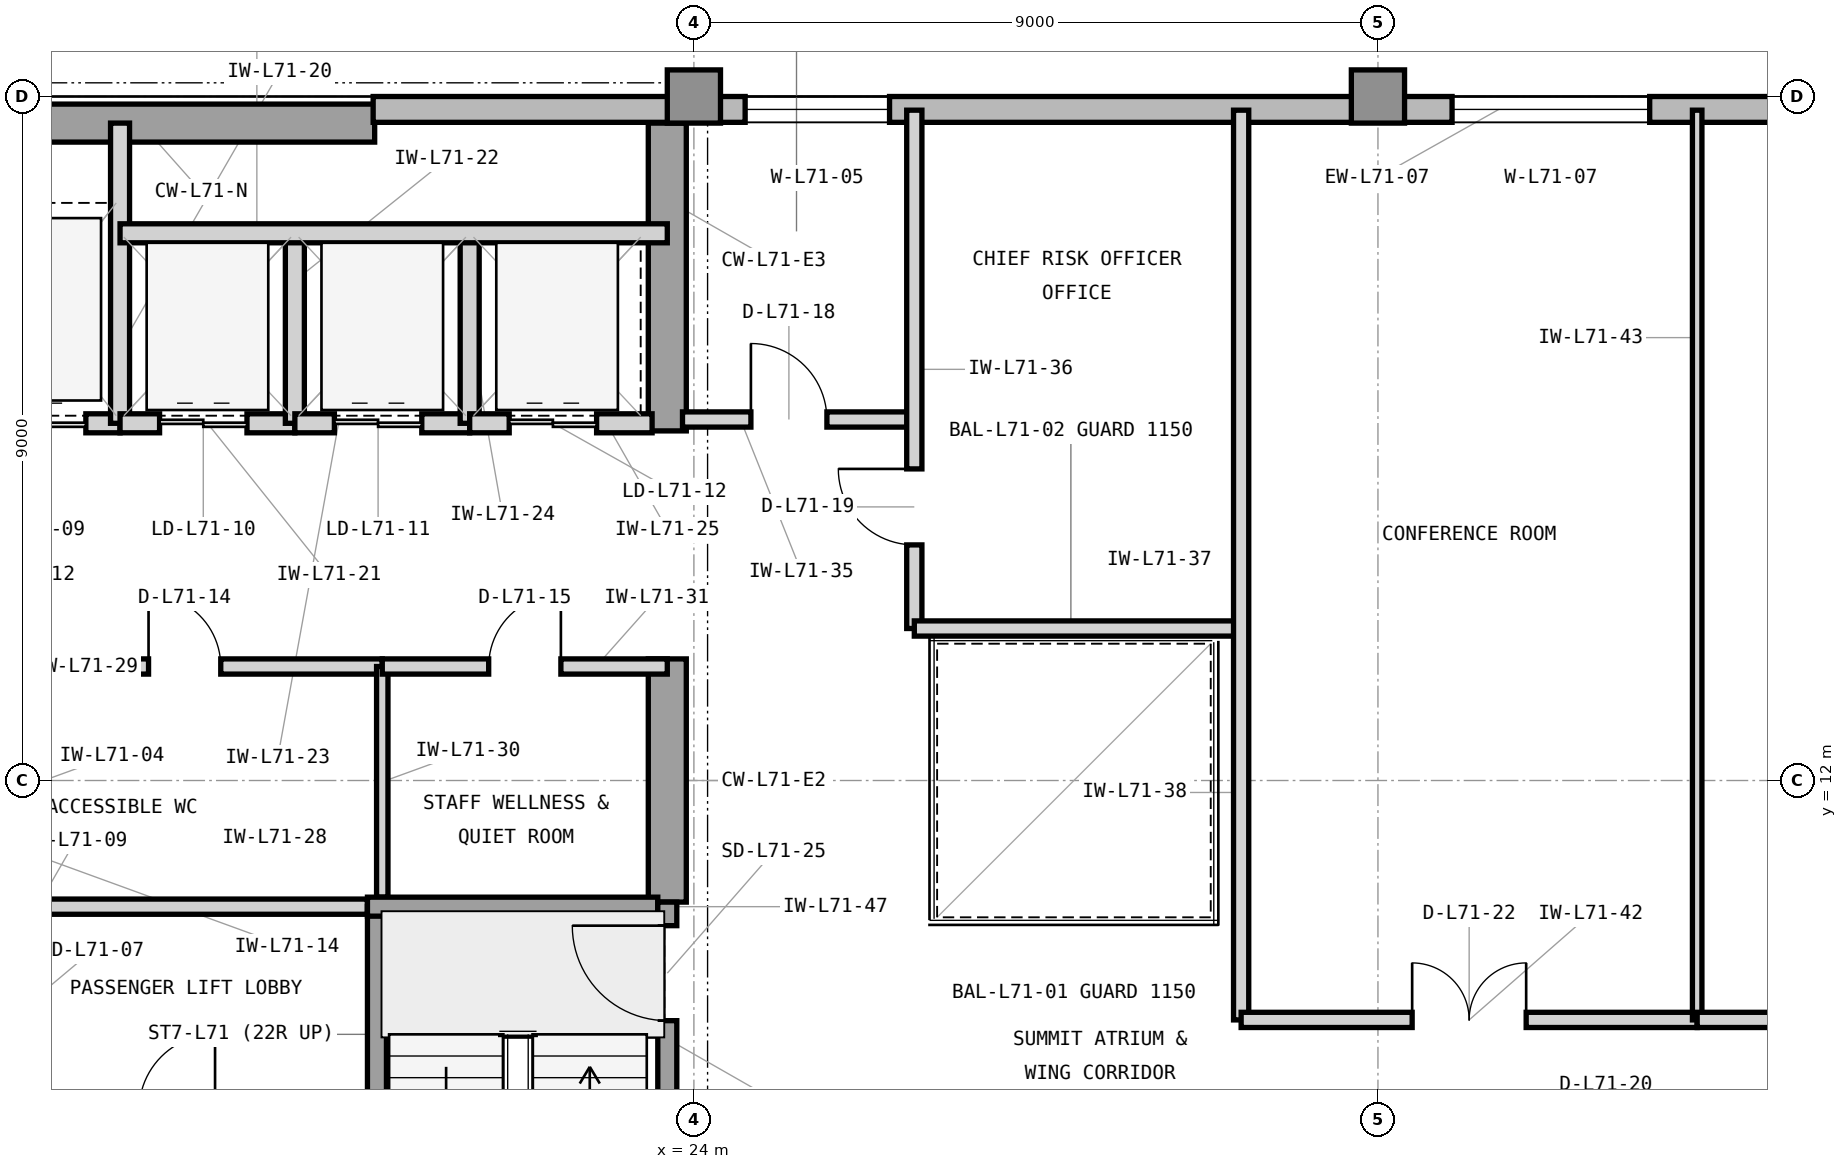
"""IFC4 building model, lengths in metres.
Left out: names, types, materials, properties, quantities, classifications, styles, units other than length and angle.
Written with IfcOpenShell. Run it as: python <this file> out.ifc"""

import sys

from ifc_helpers import new_model, si_unit, direction, frame, frame_2d, origin, origin_2d, place, context, subcontext, project, spatial, rectangle, extrude, element, fill, save


model = new_model("IFC4")
c1 = context("Model", 3, precision=1e-05, world=origin(), true_north=direction((0.0, 1.0)))
c2 = subcontext(c1, "Body", "Model", "MODEL_VIEW")
j1 = project(units=[si_unit("LENGTHUNIT", "METRE"), si_unit("PLANEANGLEUNIT", "RADIAN")], contexts=[c1])
p1 = place(None, origin())
s1 = spatial("IfcSite", under=j1, at=p1, CompositionType="ELEMENT")
p2 = place(p1, origin())
s2 = spatial("IfcBuilding", under=s1, at=p2, CompositionType="ELEMENT")
p3 = place(p2, frame((0.0, 0.0, 289.8)))
s3 = spatial("IfcBuildingStorey", under=s2, at=p3, CompositionType="ELEMENT", Elevation=289.8)
p4 = place(p3, frame((7.475, 20.65, 0.0), z_axis=(0.0, 0.0, 1.0), x_axis=(1.0, 0.0, 0.0)))
e1 = element("IfcWall", 1, at=p4, inside=s3, PredefinedType="SHEAR", context=c2, shape_type="SweptSolid", body=[
    extrude(rectangle(XDim=12.325, YDim=0.5, at=frame_2d((6.163, 0.0))), origin(), (0.0, 0.0, 1.0), 3.9),
])
p5 = place(p3, frame((23.65, 10.4, 0.0), z_axis=(0.0, 0.0, 1.0), x_axis=(0.0, 1.0, 0.0)))
e2 = element("IfcWall", 2, at=p5, inside=s3, PredefinedType="SHEAR", context=c2, shape_type="SweptSolid", body=[
    extrude(rectangle(XDim=3.2, YDim=0.5, at=frame_2d((1.6, 0.0))), origin(), (0.0, 0.0, 1.0), 3.9),
])
p6 = place(p3, frame((23.65, 16.6, 0.0), z_axis=(0.0, 0.0, 1.0), x_axis=(0.0, 1.0, 0.0)))
e3 = element("IfcWall", 3, at=p6, inside=s3, PredefinedType="SHEAR", context=c2, shape_type="SweptSolid", body=[
    extrude(rectangle(XDim=4.05, YDim=0.5, at=frame_2d((2.025, 0.0))), origin(), (0.0, 0.0, 1.0), 3.9),
])
for number, where, z_axis, x_axis in (
    (4, (24.0, 21.0, 0.0), (0.0, 0.0, 1.0), (1.0, 0.0, 0.0)),
    (5, (33.0, 21.0, 0.0), (0.0, 0.0, 1.0), (1.0, 0.0, 0.0)),
):
    element("IfcColumn", number, at=place(p3, frame(where, z_axis=z_axis, x_axis=x_axis)), inside=s3, PredefinedType="COLUMN", context=c2, shape_type="SweptSolid", body=[
        extrude(rectangle(XDim=0.7, YDim=0.7, at=origin_2d()), origin(), (0.0, 0.0, 1.0), 3.9),
    ])
p7 = place(p3, frame((49.4, 20.83, 0.0), z_axis=(0.0, 0.0, 1.0), x_axis=(-1.0, 0.0, 0.0)))
e6 = element("IfcWall", 6, at=p7, inside=s3, PredefinedType="STANDARD", context=c2, shape_type="SweptSolid", body=[
    extrude(rectangle(XDim=29.62, YDim=0.34, at=frame_2d((14.81, 0.0))), origin(), (0.0, 0.0, 1.0), 3.715),
])
p8 = place(p7, frame((22.826, 0.0, 0.8)))
e7 = element("IfcOpeningElement", 7, at=p8, cuts=e6, PredefinedType="OPENING", context=c2, shape_type="SweptSolid", body=[
    extrude(rectangle(XDim=1.9, YDim=2.35, at=frame_2d((0.95, 1.175))), frame((0.0, 0.18, 0.0), z_axis=(0.0, -1.0, 0.0), x_axis=(1.0, 0.0, 0.0)), (0.0, 0.0, 1.0), 0.36),
])
p9 = place(p7, frame((12.825, 0.0, 0.8)))
e8 = element("IfcOpeningElement", 8, at=p9, cuts=e6, PredefinedType="OPENING", context=c2, shape_type="SweptSolid", body=[
    extrude(rectangle(XDim=2.6, YDim=2.35, at=frame_2d((1.3, 1.175))), frame((0.0, 0.18, 0.0), z_axis=(0.0, -1.0, 0.0), x_axis=(1.0, 0.0, 0.0)), (0.0, 0.0, 1.0), 0.36),
])
p10 = place(p7, frame((8.375, 0.0, 0.8)))
e9 = element("IfcOpeningElement", 9, at=p10, cuts=e6, PredefinedType="OPENING", context=c2, shape_type="SweptSolid", body=[
    extrude(rectangle(XDim=2.6, YDim=2.35, at=frame_2d((1.3, 1.175))), frame((0.0, 0.18, 0.0), z_axis=(0.0, -1.0, 0.0), x_axis=(1.0, 0.0, 0.0)), (0.0, 0.0, 1.0), 0.36),
])
p11 = place(p3, frame((14.15, 16.7, 0.0), z_axis=(0.0, 0.0, 1.0), x_axis=(1.0, 0.0, 0.0)))
e10 = element("IfcWall", 10, at=p11, inside=s3, PredefinedType="PARTITIONING", context=c2, shape_type="SweptSolid", body=[
    extrude(rectangle(XDim=2.3, YDim=0.25, at=frame_2d((1.15, 0.0))), origin(), (0.0, 0.0, 1.0), 3.354),
])
p12 = place(p11, frame((0.45, 0.0, 0.0)))
e11 = element("IfcOpeningElement", 11, at=p12, cuts=e10, PredefinedType="OPENING", context=c2, shape_type="SweptSolid", body=[
    extrude(rectangle(XDim=1.4, YDim=2.35, at=frame_2d((0.7, 1.175))), frame((0.0, 0.135, 0.0), z_axis=(0.0, -1.0, 0.0), x_axis=(1.0, 0.0, 0.0)), (0.0, 0.0, 1.0), 0.27),
])
p13 = place(p3, frame((16.45, 16.7, 0.0), z_axis=(0.0, 0.0, 1.0), x_axis=(0.0, 1.0, 0.0)))
e12 = element("IfcWall", 12, at=p13, inside=s3, PredefinedType="PARTITIONING", context=c2, shape_type="SweptSolid", body=[
    extrude(rectangle(XDim=3.95, YDim=0.25, at=frame_2d((1.975, 0.0))), origin(), (0.0, 0.0, 1.0), 3.705),
])
p14 = place(p3, frame((16.45, 16.7, 0.0), z_axis=(0.0, 0.0, 1.0), x_axis=(1.0, 0.0, 0.0)))
e13 = element("IfcWall", 13, at=p14, inside=s3, PredefinedType="PARTITIONING", context=c2, shape_type="SweptSolid", body=[
    extrude(rectangle(XDim=2.3, YDim=0.25, at=frame_2d((1.15, 0.0))), origin(), (0.0, 0.0, 1.0), 3.354),
])
p15 = place(p14, frame((0.52, 0.0, 0.0)))
e14 = element("IfcOpeningElement", 14, at=p15, cuts=e13, PredefinedType="OPENING", context=c2, shape_type="SweptSolid", body=[
    extrude(rectangle(XDim=1.15, YDim=2.25, at=frame_2d((0.575, 1.125))), frame((0.0, 0.135, 0.0), z_axis=(0.0, -1.0, 0.0), x_axis=(1.0, 0.0, 0.0)), (0.0, 0.0, 1.0), 0.27),
])
p16 = place(p3, frame((18.75, 16.7, 0.0), z_axis=(0.0, 0.0, 1.0), x_axis=(0.0, 1.0, 0.0)))
e15 = element("IfcWall", 15, at=p16, inside=s3, PredefinedType="PARTITIONING", context=c2, shape_type="SweptSolid", body=[
    extrude(rectangle(XDim=2.5, YDim=0.25, at=frame_2d((1.25, 0.0))), origin(), (0.0, 0.0, 1.0), 3.705),
])
p17 = place(p3, frame((18.75, 16.7, 0.0), z_axis=(0.0, 0.0, 1.0), x_axis=(1.0, 0.0, 0.0)))
e16 = element("IfcWall", 16, at=p17, inside=s3, PredefinedType="PARTITIONING", context=c2, shape_type="SweptSolid", body=[
    extrude(rectangle(XDim=2.3, YDim=0.25, at=frame_2d((1.15, 0.0))), origin(), (0.0, 0.0, 1.0), 3.354),
])
p18 = place(p17, frame((0.52, 0.0, 0.0)))
e17 = element("IfcOpeningElement", 17, at=p18, cuts=e16, PredefinedType="OPENING", context=c2, shape_type="SweptSolid", body=[
    extrude(rectangle(XDim=1.15, YDim=2.25, at=frame_2d((0.575, 1.125))), frame((0.0, 0.135, 0.0), z_axis=(0.0, -1.0, 0.0), x_axis=(1.0, 0.0, 0.0)), (0.0, 0.0, 1.0), 0.27),
])
p19 = place(p3, frame((21.05, 16.7, 0.0), z_axis=(0.0, 0.0, 1.0), x_axis=(0.0, 1.0, 0.0)))
e18 = element("IfcWall", 18, at=p19, inside=s3, PredefinedType="PARTITIONING", context=c2, shape_type="SweptSolid", body=[
    extrude(rectangle(XDim=2.5, YDim=0.25, at=frame_2d((1.25, 0.0))), origin(), (0.0, 0.0, 1.0), 3.705),
])
p20 = place(p3, frame((21.05, 16.7, 0.0), z_axis=(0.0, 0.0, 1.0), x_axis=(1.0, 0.0, 0.0)))
e19 = element("IfcWall", 19, at=p20, inside=s3, PredefinedType="PARTITIONING", context=c2, shape_type="SweptSolid", body=[
    extrude(rectangle(XDim=2.4, YDim=0.25, at=frame_2d((1.2, 0.0))), origin(), (0.0, 0.0, 1.0), 3.354),
])
p21 = place(p20, frame((0.52, 0.0, 0.0)))
e20 = element("IfcOpeningElement", 20, at=p21, cuts=e19, PredefinedType="OPENING", context=c2, shape_type="SweptSolid", body=[
    extrude(rectangle(XDim=1.15, YDim=2.25, at=frame_2d((0.575, 1.125))), frame((0.0, 0.135, 0.0), z_axis=(0.0, -1.0, 0.0), x_axis=(1.0, 0.0, 0.0)), (0.0, 0.0, 1.0), 0.27),
])
p22 = place(p3, frame((16.45, 19.2, 0.0), z_axis=(0.0, 0.0, 1.0), x_axis=(1.0, 0.0, 0.0)))
e21 = element("IfcWall", 21, at=p22, inside=s3, PredefinedType="PARTITIONING", context=c2, shape_type="SweptSolid", body=[
    extrude(rectangle(XDim=7.2, YDim=0.25, at=frame_2d((3.6, 0.0))), origin(), (0.0, 0.0, 1.0), 3.705),
])
p23 = place(p3, frame((14.825, 10.34, 0.0), z_axis=(0.0, 0.0, 1.0), x_axis=(1.0, 0.0, 0.0)))
e22 = element("IfcWall", 22, at=p23, inside=s3, PredefinedType="PARTITIONING", context=c2, shape_type="SweptSolid", body=[
    extrude(rectangle(XDim=4.88, YDim=0.2, at=frame_2d((2.44, 0.0))), origin(), (0.0, 0.0, 1.0), 3.705),
])
p24 = place(p3, frame((14.7, 13.5, 0.0), z_axis=(0.0, 0.0, 1.0), x_axis=(1.0, 0.0, 0.0)))
e23 = element("IfcWall", 23, at=p24, inside=s3, PredefinedType="PARTITIONING", context=c2, shape_type="SweptSolid", body=[
    extrude(rectangle(XDim=5.2, YDim=0.2, at=frame_2d((2.6, 0.0))), origin(), (0.0, 0.0, 1.0), 3.354),
])
p25 = place(p24, frame((2.125, 0.0, 0.0)))
e24 = element("IfcOpeningElement", 24, at=p25, cuts=e23, PredefinedType="OPENING", context=c2, shape_type="SweptSolid", body=[
    extrude(rectangle(XDim=0.95, YDim=2.1, at=frame_2d((0.475, 1.05))), frame((0.0, 0.11, 0.0), z_axis=(0.0, -1.0, 0.0), x_axis=(1.0, 0.0, 0.0)), (0.0, 0.0, 1.0), 0.22),
])
p26 = place(p3, frame((19.9, 10.465, 0.0), z_axis=(0.0, 0.0, 1.0), x_axis=(0.0, 1.0, 0.0)))
e25 = element("IfcWall", 25, at=p26, inside=s3, PredefinedType="PARTITIONING", context=c2, shape_type="SweptSolid", body=[
    extrude(rectangle(XDim=3.035, YDim=0.15, at=frame_2d((1.518, 0.0))), origin(), (0.0, 0.0, 1.0), 3.705),
])
p27 = place(p3, frame((19.9, 13.5, 0.0), z_axis=(0.0, 0.0, 1.0), x_axis=(1.0, 0.0, 0.0)))
e26 = element("IfcWall", 26, at=p27, inside=s3, PredefinedType="PARTITIONING", context=c2, shape_type="SweptSolid", body=[
    extrude(rectangle(XDim=3.75, YDim=0.2, at=frame_2d((1.875, 0.0))), origin(), (0.0, 0.0, 1.0), 3.354),
])
p28 = place(p27, frame((1.4, 0.0, 0.0)))
e27 = element("IfcOpeningElement", 27, at=p28, cuts=e26, PredefinedType="OPENING", context=c2, shape_type="SweptSolid", body=[
    extrude(rectangle(XDim=0.95, YDim=2.1, at=frame_2d((0.475, 1.05))), frame((0.0, 0.11, 0.0), z_axis=(0.0, -1.0, 0.0), x_axis=(1.0, 0.0, 0.0)), (0.0, 0.0, 1.0), 0.22),
])
p29 = place(p3, frame((23.85, 16.75, 0.0), z_axis=(0.0, 0.0, 1.0), x_axis=(1.0, 0.0, 0.0)))
e28 = element("IfcWall", 28, at=p29, inside=s3, PredefinedType="PARTITIONING", context=c2, shape_type="SweptSolid", body=[
    extrude(rectangle(XDim=3.05, YDim=0.2, at=frame_2d((1.525, 0.0))), origin(), (0.0, 0.0, 1.0), 3.705),
])
p30 = place(p29, frame((0.9, 0.0, 0.0)))
e29 = element("IfcOpeningElement", 29, at=p30, cuts=e28, PredefinedType="OPENING", context=c2, shape_type="SweptSolid", body=[
    extrude(rectangle(XDim=1.0, YDim=2.15, at=frame_2d((0.5, 1.075))), frame((0.0, 0.11, 0.0), z_axis=(0.0, -1.0, 0.0), x_axis=(1.0, 0.0, 0.0)), (0.0, 0.0, 1.0), 0.22),
])
p31 = place(p3, frame((26.9, 14.0, 0.0), z_axis=(0.0, 0.0, 1.0), x_axis=(0.0, 1.0, 0.0)))
e30 = element("IfcWall", 30, at=p31, inside=s3, PredefinedType="PARTITIONING", context=c2, shape_type="SweptSolid", body=[
    extrude(rectangle(XDim=6.82, YDim=0.2, at=frame_2d((3.41, 0.0))), origin(), (0.0, 0.0, 1.0), 3.705),
])
p32 = place(p31, frame((1.1, 0.0, 0.0)))
e31 = element("IfcOpeningElement", 31, at=p32, cuts=e30, PredefinedType="OPENING", context=c2, shape_type="SweptSolid", body=[
    extrude(rectangle(XDim=1.0, YDim=2.15, at=frame_2d((0.5, 1.075))), frame((0.0, 0.11, 0.0), z_axis=(0.0, -1.0, 0.0), x_axis=(1.0, 0.0, 0.0)), (0.0, 0.0, 1.0), 0.22),
])
p33 = place(p3, frame((26.9, 14.0, 0.0), z_axis=(0.0, 0.0, 1.0), x_axis=(1.0, 0.0, 0.0)))
e32 = element("IfcWall", 32, at=p33, inside=s3, PredefinedType="PARTITIONING", context=c2, shape_type="SweptSolid", body=[
    extrude(rectangle(XDim=4.3, YDim=0.2, at=frame_2d((2.15, 0.0))), origin(), (0.0, 0.0, 1.0), 3.705),
])
p34 = place(p3, frame((31.2, 8.85, 0.0), z_axis=(0.0, 0.0, 1.0), x_axis=(0.0, 1.0, 0.0)))
e33 = element("IfcWall", 33, at=p34, inside=s3, PredefinedType="PARTITIONING", context=c2, shape_type="SweptSolid", body=[
    extrude(rectangle(XDim=11.97, YDim=0.2, at=frame_2d((5.985, 0.0))), origin(), (0.0, 0.0, 1.0), 3.705),
])
p35 = place(p3, frame((31.2, 8.85, 0.0), z_axis=(0.0, 0.0, 1.0), x_axis=(1.0, 0.0, 0.0)))
e34 = element("IfcWall", 34, at=p35, inside=s3, PredefinedType="PARTITIONING", context=c2, shape_type="SweptSolid", body=[
    extrude(rectangle(XDim=6.0, YDim=0.2, at=frame_2d((3.0, 0.0))), origin(), (0.0, 0.0, 1.0), 3.705),
])
p36 = place(p35, frame((2.25, 0.0, 0.0)))
e35 = element("IfcOpeningElement", 35, at=p36, cuts=e34, PredefinedType="OPENING", context=c2, shape_type="SweptSolid", body=[
    extrude(rectangle(XDim=1.5, YDim=2.3, at=frame_2d((0.75, 1.15))), frame((0.0, 0.11, 0.0), z_axis=(0.0, -1.0, 0.0), x_axis=(1.0, 0.0, 0.0)), (0.0, 0.0, 1.0), 0.22),
])
p37 = place(p3, frame((37.2, 8.85, 0.0), z_axis=(0.0, 0.0, 1.0), x_axis=(0.0, 1.0, 0.0)))
e36 = element("IfcWall", 36, at=p37, inside=s3, PredefinedType="PARTITIONING", context=c2, shape_type="SweptSolid", body=[
    extrude(rectangle(XDim=11.97, YDim=0.125, at=frame_2d((5.985, 0.0))), origin(), (0.0, 0.0, 1.0), 3.705),
])
p38 = place(p3, frame((37.2, 8.85, 0.0), z_axis=(0.0, 0.0, 1.0), x_axis=(1.0, 0.0, 0.0)))
e37 = element("IfcWall", 37, at=p38, inside=s3, PredefinedType="PARTITIONING", context=c2, shape_type="SweptSolid", body=[
    extrude(rectangle(XDim=7.3, YDim=0.2, at=frame_2d((3.65, 0.0))), origin(), (0.0, 0.0, 1.0), 3.705),
])
p39 = place(p38, frame((3.15, 0.0, 0.0)))
e38 = element("IfcOpeningElement", 38, at=p39, cuts=e37, PredefinedType="OPENING", context=c2, shape_type="SweptSolid", body=[
    extrude(rectangle(XDim=1.0, YDim=2.15, at=frame_2d((0.5, 1.075))), frame((0.0, 0.11, 0.0), z_axis=(0.0, -1.0, 0.0), x_axis=(1.0, 0.0, 0.0)), (0.0, 0.0, 1.0), 0.22),
])
p40 = place(p3, frame((19.83, 3.6, 0.0), z_axis=(0.0, 0.0, 1.0), x_axis=(0.0, 1.0, 0.0)))
e39 = element("IfcWall", 39, at=p40, inside=s3, PredefinedType="SHEAR", context=c2, shape_type="SweptSolid", body=[
    extrude(rectangle(XDim=6.74, YDim=0.25, at=frame_2d((3.37, 0.0))), origin(), (0.0, 0.0, 1.0), 3.9),
])
p41 = place(p3, frame((19.705, 10.34, 0.0), z_axis=(0.0, 0.0, 1.0), x_axis=(1.0, 0.0, 0.0)))
e40 = element("IfcWall", 40, at=p41, inside=s3, PredefinedType="SHEAR", context=c2, shape_type="SweptSolid", body=[
    extrude(rectangle(XDim=3.82, YDim=0.25, at=frame_2d((1.91, 0.0))), origin(), (0.0, 0.0, 1.0), 3.9),
])
p42 = place(p3, frame((23.65, 6.8, 0.0), z_axis=(0.0, 0.0, 1.0), x_axis=(0.0, 1.0, 0.0)))
e41 = element("IfcWall", 41, at=p42, inside=s3, PredefinedType="SHEAR", context=c2, shape_type="SweptSolid", body=[
    extrude(rectangle(XDim=3.6, YDim=0.25, at=frame_2d((1.8, 0.0))), origin(), (0.0, 0.0, 1.0), 3.9),
])
p43 = place(p42, frame((2.04, 0.0, 0.0)))
e42 = element("IfcOpeningElement", 42, at=p43, cuts=e41, PredefinedType="OPENING", context=c2, shape_type="SweptSolid", body=[
    extrude(rectangle(XDim=1.25, YDim=2.2, at=frame_2d((0.625, 1.1))), frame((0.0, 0.135, 0.0), z_axis=(0.0, -1.0, 0.0), x_axis=(1.0, 0.0, 0.0)), (0.0, 0.0, 1.0), 0.27),
])
p44 = place(p12, origin())
e43 = element("IfcDoor", 43, at=p44, inside=s3, OperationType="DOUBLE_DOOR_SLIDING", PredefinedType="DOOR", context=c2, shape_type="SweptSolid", body=[
    extrude(rectangle(XDim=1.4, YDim=2.35, at=frame_2d((0.7, 1.175))), frame((0.0, 0.025, 0.0), z_axis=(0.0, -1.0, 0.0), x_axis=(1.0, 0.0, 0.0)), (0.0, 0.0, 1.0), 0.05),
])
fill(e11, e43)
p45 = place(p15, origin())
e44 = element("IfcDoor", 44, at=p45, inside=s3, OperationType="DOUBLE_DOOR_SLIDING", PredefinedType="DOOR", context=c2, shape_type="SweptSolid", body=[
    extrude(rectangle(XDim=1.15, YDim=2.25, at=frame_2d((0.575, 1.125))), frame((0.0, 0.025, 0.0), z_axis=(0.0, -1.0, 0.0), x_axis=(1.0, 0.0, 0.0)), (0.0, 0.0, 1.0), 0.05),
])
fill(e14, e44)
p46 = place(p18, origin())
e45 = element("IfcDoor", 45, at=p46, inside=s3, OperationType="DOUBLE_DOOR_SLIDING", PredefinedType="DOOR", context=c2, shape_type="SweptSolid", body=[
    extrude(rectangle(XDim=1.15, YDim=2.25, at=frame_2d((0.575, 1.125))), frame((0.0, 0.025, 0.0), z_axis=(0.0, -1.0, 0.0), x_axis=(1.0, 0.0, 0.0)), (0.0, 0.0, 1.0), 0.05),
])
fill(e17, e45)
p47 = place(p21, origin())
e46 = element("IfcDoor", 46, at=p47, inside=s3, OperationType="DOUBLE_DOOR_SLIDING", PredefinedType="DOOR", context=c2, shape_type="SweptSolid", body=[
    extrude(rectangle(XDim=1.15, YDim=2.25, at=frame_2d((0.575, 1.125))), frame((0.0, 0.025, 0.0), z_axis=(0.0, -1.0, 0.0), x_axis=(1.0, 0.0, 0.0)), (0.0, 0.0, 1.0), 0.05),
])
fill(e20, e46)
p48 = place(p25, origin())
e47 = element("IfcDoor", 47, at=p48, inside=s3, OperationType="SINGLE_SWING_LEFT", PredefinedType="DOOR", context=c2, shape_type="SweptSolid", body=[
    extrude(rectangle(XDim=0.95, YDim=2.1, at=frame_2d((0.475, 1.05))), frame((0.0, 0.025, 0.0), z_axis=(0.0, -1.0, 0.0), x_axis=(1.0, 0.0, 0.0)), (0.0, 0.0, 1.0), 0.05),
])
fill(e24, e47)
p49 = place(p28, origin())
e48 = element("IfcDoor", 48, at=p49, inside=s3, OperationType="SINGLE_SWING_RIGHT", PredefinedType="DOOR", context=c2, shape_type="SweptSolid", body=[
    extrude(rectangle(XDim=0.95, YDim=2.1, at=frame_2d((0.475, 1.05))), frame((0.0, 0.025, 0.0), z_axis=(0.0, -1.0, 0.0), x_axis=(1.0, 0.0, 0.0)), (0.0, 0.0, 1.0), 0.05),
])
fill(e27, e48)
p50 = place(p30, origin())
e49 = element("IfcDoor", 49, at=p50, inside=s3, OperationType="SINGLE_SWING_LEFT", PredefinedType="DOOR", context=c2, shape_type="SweptSolid", body=[
    extrude(rectangle(XDim=1.0, YDim=2.15, at=frame_2d((0.5, 1.075))), frame((0.0, 0.025, 0.0), z_axis=(0.0, -1.0, 0.0), x_axis=(1.0, 0.0, 0.0)), (0.0, 0.0, 1.0), 0.05),
])
fill(e29, e49)
p51 = place(p32, origin())
e50 = element("IfcDoor", 50, at=p51, inside=s3, OperationType="SINGLE_SWING_RIGHT", PredefinedType="DOOR", context=c2, shape_type="SweptSolid", body=[
    extrude(rectangle(XDim=1.0, YDim=2.15, at=frame_2d((0.5, 1.075))), frame((0.0, 0.025, 0.0), z_axis=(0.0, -1.0, 0.0), x_axis=(1.0, 0.0, 0.0)), (0.0, 0.0, 1.0), 0.05),
])
fill(e31, e50)
p52 = place(p36, origin())
e51 = element("IfcDoor", 51, at=p52, inside=s3, OperationType="DOUBLE_DOOR_SINGLE_SWING", PredefinedType="DOOR", context=c2, shape_type="SweptSolid", body=[
    extrude(rectangle(XDim=1.5, YDim=2.3, at=frame_2d((0.75, 1.15))), frame((0.0, 0.025, 0.0), z_axis=(0.0, -1.0, 0.0), x_axis=(1.0, 0.0, 0.0)), (0.0, 0.0, 1.0), 0.05),
])
fill(e35, e51)
p53 = place(p43, origin())
e52 = element("IfcDoor", 52, at=p53, inside=s3, OperationType="SINGLE_SWING_RIGHT", PredefinedType="DOOR", context=c2, shape_type="SweptSolid", body=[
    extrude(rectangle(XDim=1.25, YDim=2.2, at=frame_2d((0.625, 1.1))), frame((0.0, 0.025, 0.0), z_axis=(0.0, -1.0, 0.0), x_axis=(1.0, 0.0, 0.0)), (0.0, 0.0, 1.0), 0.05),
])
fill(e42, e52)
p54 = place(p8, origin())
e53 = element("IfcWindow", 53, at=p54, inside=s3, PartitioningType="SINGLE_PANEL", PredefinedType="WINDOW", context=c2, shape_type="SweptSolid", body=[
    extrude(rectangle(XDim=1.9, YDim=2.35, at=frame_2d((0.95, 1.175))), frame((0.0, 0.11, 0.0), z_axis=(0.0, -1.0, 0.0), x_axis=(1.0, 0.0, 0.0)), (0.0, 0.0, 1.0), 0.06),
])
fill(e7, e53)
p55 = place(p9, origin())
e54 = element("IfcWindow", 54, at=p55, inside=s3, PartitioningType="SINGLE_PANEL", PredefinedType="WINDOW", context=c2, shape_type="SweptSolid", body=[
    extrude(rectangle(XDim=2.6, YDim=2.35, at=frame_2d((1.3, 1.175))), frame((0.0, 0.11, 0.0), z_axis=(0.0, -1.0, 0.0), x_axis=(1.0, 0.0, 0.0)), (0.0, 0.0, 1.0), 0.06),
])
fill(e8, e54)
save(model, sys.argv[1])
